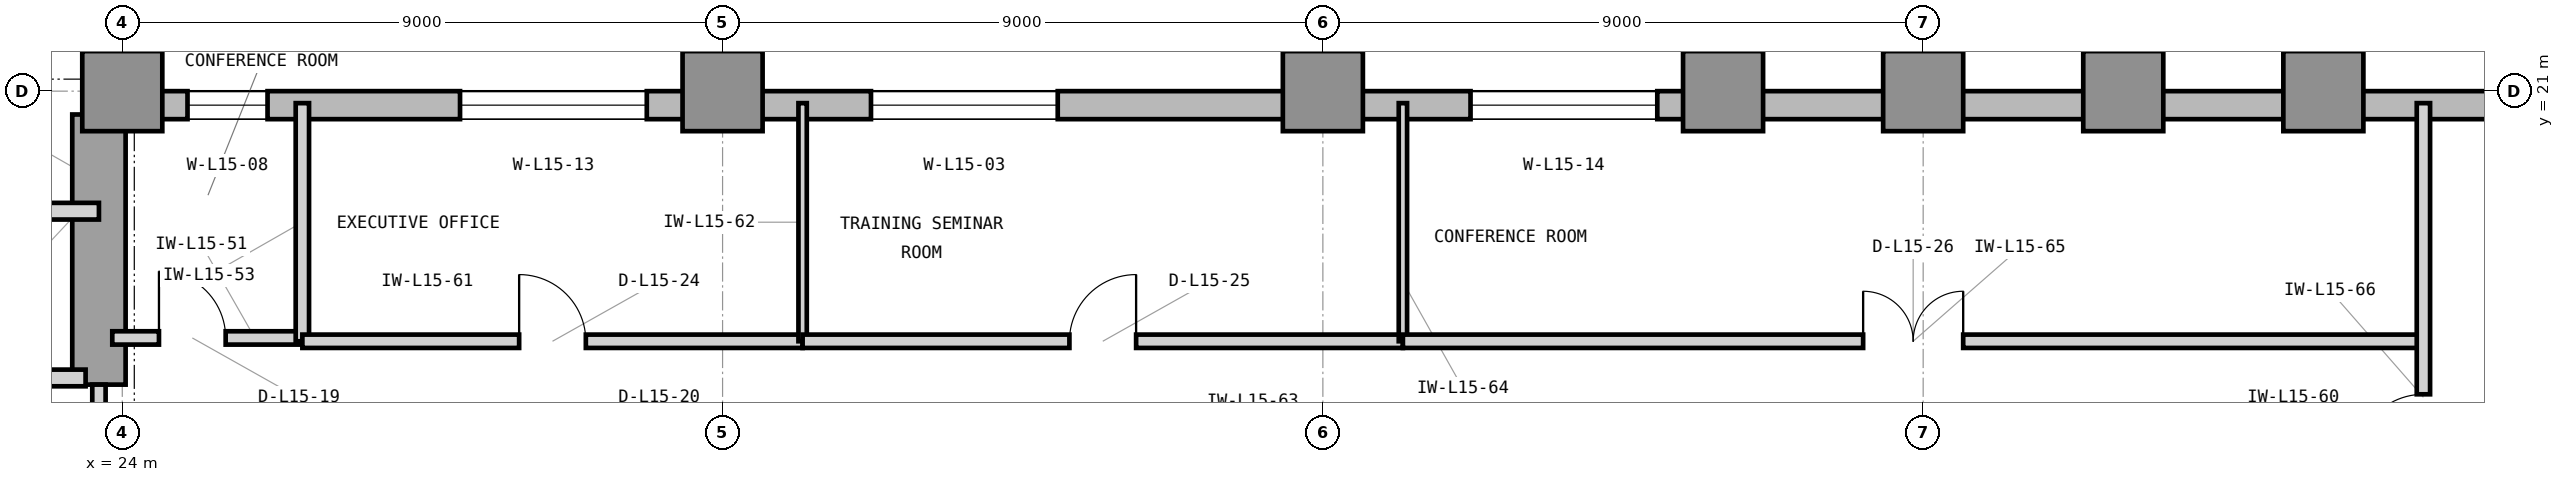
"""IFC4 building model, lengths in metres.
Left out: names, types, materials, properties, quantities, classifications, styles, units other than length and angle.
Written with IfcOpenShell. Run it as: python <this file> out.ifc"""

import sys

from ifc_helpers import new_model, si_unit, direction, frame, frame_2d, origin, origin_2d, place, context, subcontext, project, spatial, rectangle, extrude, element, fill, save


model = new_model("IFC4")
c1 = context("Model", 3, precision=1e-05, world=origin(), true_north=direction((0.0, 1.0)))
c2 = subcontext(c1, "Body", "Model", "MODEL_VIEW")
j1 = project(units=[si_unit("LENGTHUNIT", "METRE"), si_unit("PLANEANGLEUNIT", "RADIAN")], contexts=[c1])
p1 = place(None, origin())
s1 = spatial("IfcSite", under=j1, at=p1, CompositionType="ELEMENT")
p2 = place(p1, origin())
s2 = spatial("IfcBuilding", under=s1, at=p2, CompositionType="ELEMENT")
p3 = place(p2, frame((0.0, 0.0, 67.8)))
s3 = spatial("IfcBuildingStorey", under=s2, at=p3, CompositionType="ELEMENT", Elevation=67.8)
p4 = place(p3, frame((23.65, 16.6, 0.0), z_axis=(0.0, 0.0, 1.0), x_axis=(0.0, 1.0, 0.0)))
e1 = element("IfcWall", 1, at=p4, inside=s3, PredefinedType="SHEAR", context=c2, shape_type="SweptSolid", body=[
    extrude(rectangle(XDim=4.05, YDim=0.8, at=frame_2d((2.025, 0.0))), origin(), (0.0, 0.0, 1.0), 4.2),
])
for number, where, z_axis, x_axis in (
    (2, (24.0, 21.0, 0.0), (0.0, 0.0, 1.0), (1.0, 0.0, 0.0)),
    (3, (33.0, 21.0, 0.0), (0.0, 0.0, 1.0), (1.0, 0.0, 0.0)),
    (4, (42.0, 21.0, 0.0), (0.0, 0.0, 1.0), (1.0, 0.0, 0.0)),
    (5, (48.0, 21.0, 0.0), (0.0, 0.0, 1.0), (1.0, 0.0, 0.0)),
    (6, (51.0, 21.0, 0.0), (0.0, 0.0, 1.0), (1.0, 0.0, 0.0)),
    (7, (54.0, 21.0, 0.0), (0.0, 0.0, 1.0), (1.0, 0.0, 0.0)),
    (8, (57.0, 21.0, 0.0), (0.0, 0.0, 1.0), (1.0, 0.0, 0.0)),
):
    element("IfcColumn", number, at=place(p3, frame(where, z_axis=z_axis, x_axis=x_axis)), inside=s3, PredefinedType="COLUMN", context=c2, shape_type="SweptSolid", body=[
        extrude(rectangle(XDim=1.2, YDim=1.2, at=origin_2d()), origin(), (0.0, 0.0, 1.0), 4.2),
    ])
p5 = place(p3, frame((64.4, 20.79, 0.0), z_axis=(0.0, 0.0, 1.0), x_axis=(-1.0, 0.0, 0.0)))
e9 = element("IfcWall", 9, at=p5, inside=s3, PredefinedType="STANDARD", context=c2, shape_type="SweptSolid", body=[
    extrude(rectangle(XDim=40.4, YDim=0.42, at=frame_2d((20.2, 0.0))), origin(), (0.0, 0.0, 1.0), 3.98),
])
p6 = place(p5, frame((26.375, 0.0, 0.85)))
e10 = element("IfcOpeningElement", 10, at=p6, cuts=e9, PredefinedType="OPENING", context=c2, shape_type="SweptSolid", body=[
    extrude(rectangle(XDim=2.8, YDim=2.45, at=frame_2d((1.4, 1.225))), frame((0.0, 0.22, 0.0), z_axis=(0.0, -1.0, 0.0), x_axis=(1.0, 0.0, 0.0)), (0.0, 0.0, 1.0), 0.44),
])
p7 = place(p5, frame((38.222, 0.0, 0.85)))
e11 = element("IfcOpeningElement", 11, at=p7, cuts=e9, PredefinedType="OPENING", context=c2, shape_type="SweptSolid", body=[
    extrude(rectangle(XDim=1.2, YDim=2.45, at=frame_2d((0.6, 1.225))), frame((0.0, 0.22, 0.0), z_axis=(0.0, -1.0, 0.0), x_axis=(1.0, 0.0, 0.0)), (0.0, 0.0, 1.0), 0.44),
])
p8 = place(p5, frame((32.536, 0.0, 0.85)))
e12 = element("IfcOpeningElement", 12, at=p8, cuts=e9, PredefinedType="OPENING", context=c2, shape_type="SweptSolid", body=[
    extrude(rectangle(XDim=2.8, YDim=2.45, at=frame_2d((1.4, 1.225))), frame((0.0, 0.22, 0.0), z_axis=(0.0, -1.0, 0.0), x_axis=(1.0, 0.0, 0.0)), (0.0, 0.0, 1.0), 0.44),
])
p9 = place(p5, frame((17.386, 0.0, 0.85)))
e13 = element("IfcOpeningElement", 13, at=p9, cuts=e9, PredefinedType="OPENING", context=c2, shape_type="SweptSolid", body=[
    extrude(rectangle(XDim=2.8, YDim=2.45, at=frame_2d((1.4, 1.225))), frame((0.0, 0.22, 0.0), z_axis=(0.0, -1.0, 0.0), x_axis=(1.0, 0.0, 0.0)), (0.0, 0.0, 1.0), 0.44),
])
p10 = place(p3, frame((23.79, 21.0, 0.0), z_axis=(0.0, 0.0, 1.0), x_axis=(0.0, 1.0, 0.0)))
e14 = element("IfcWall", 14, at=p10, inside=s3, PredefinedType="STANDARD", context=c2, shape_type="SweptSolid", body=[
    extrude(rectangle(XDim=28.4, YDim=0.42, at=frame_2d((14.2, 0.0))), origin(), (0.0, 0.0, 1.0), 3.98),
])
p11 = place(p10, frame((10.433, 0.0, 0.85)))
e15 = element("IfcOpeningElement", 15, at=p11, cuts=e14, PredefinedType="OPENING", context=c2, shape_type="SweptSolid", body=[
    extrude(rectangle(XDim=2.8, YDim=2.45, at=frame_2d((1.4, 1.225))), frame((0.0, 0.22, 0.0), z_axis=(0.0, -1.0, 0.0), x_axis=(1.0, 0.0, 0.0)), (0.0, 0.0, 1.0), 0.44),
])
p12 = place(p10, frame((16.016, 0.0, 0.85)))
e16 = element("IfcOpeningElement", 16, at=p12, cuts=e14, PredefinedType="OPENING", context=c2, shape_type="SweptSolid", body=[
    extrude(rectangle(XDim=1.2, YDim=2.45, at=frame_2d((0.6, 1.225))), frame((0.0, 0.22, 0.0), z_axis=(0.0, -1.0, 0.0), x_axis=(1.0, 0.0, 0.0)), (0.0, 0.0, 1.0), 0.44),
])
p13 = place(p3, frame((21.05, 16.7, 0.0), z_axis=(0.0, 0.0, 1.0), x_axis=(1.0, 0.0, 0.0)))
e17 = element("IfcWall", 17, at=p13, inside=s3, PredefinedType="PARTITIONING", context=c2, shape_type="SweptSolid", body=[
    extrude(rectangle(XDim=2.4, YDim=0.25, at=frame_2d((1.2, 0.0))), origin(), (0.0, 0.0, 1.0), 3.426),
])
p14 = place(p3, frame((16.45, 19.2, 0.0), z_axis=(0.0, 0.0, 1.0), x_axis=(1.0, 0.0, 0.0)))
e18 = element("IfcWall", 18, at=p14, inside=s3, PredefinedType="PARTITIONING", context=c2, shape_type="SweptSolid", body=[
    extrude(rectangle(XDim=7.2, YDim=0.25, at=frame_2d((3.6, 0.0))), origin(), (0.0, 0.0, 1.0), 3.97),
])
p15 = place(p3, frame((23.65, 13.6, 0.0), z_axis=(0.0, 0.0, 1.0), x_axis=(0.0, 1.0, 0.0)))
e19 = element("IfcWall", 19, at=p15, inside=s3, PredefinedType="PARTITIONING", context=c2, shape_type="SweptSolid", body=[
    extrude(rectangle(XDim=3.0, YDim=0.2, at=frame_2d((1.5, 0.0))), origin(), (0.0, 0.0, 1.0), 3.97),
])
p16 = place(p15, frame((1.02, 0.0, 0.0)))
e20 = element("IfcOpeningElement", 20, at=p16, cuts=e19, PredefinedType="OPENING", context=c2, shape_type="SweptSolid", body=[
    extrude(rectangle(XDim=0.95, YDim=2.1, at=frame_2d((0.475, 1.05))), frame((0.0, 0.11, 0.0), z_axis=(0.0, -1.0, 0.0), x_axis=(1.0, 0.0, 0.0)), (0.0, 0.0, 1.0), 0.22),
])
p17 = place(p3, frame((23.85, 17.3, 0.0), z_axis=(0.0, 0.0, 1.0), x_axis=(1.0, 0.0, 0.0)))
e21 = element("IfcWall", 21, at=p17, inside=s3, PredefinedType="PARTITIONING", context=c2, shape_type="SweptSolid", body=[
    extrude(rectangle(XDim=2.85, YDim=0.2, at=frame_2d((1.425, 0.0))), origin(), (0.0, 0.0, 1.0), 3.97),
])
p18 = place(p17, frame((0.7, 0.0, 0.0)))
e22 = element("IfcOpeningElement", 22, at=p18, cuts=e21, PredefinedType="OPENING", context=c2, shape_type="SweptSolid", body=[
    extrude(rectangle(XDim=1.0, YDim=2.15, at=frame_2d((0.5, 1.075))), frame((0.0, 0.11, 0.0), z_axis=(0.0, -1.0, 0.0), x_axis=(1.0, 0.0, 0.0)), (0.0, 0.0, 1.0), 0.22),
])
p19 = place(p3, frame((26.7, 17.25, 0.0), z_axis=(0.0, 0.0, 1.0), x_axis=(0.0, 1.0, 0.0)))
e23 = element("IfcWall", 23, at=p19, inside=s3, PredefinedType="PARTITIONING", context=c2, shape_type="SweptSolid", body=[
    extrude(rectangle(XDim=3.57, YDim=0.2, at=frame_2d((1.785, 0.0))), origin(), (0.0, 0.0, 1.0), 3.97),
])
p20 = place(p3, frame((26.7, 17.25, 0.0), z_axis=(0.0, 0.0, 1.0), x_axis=(1.0, 0.0, 0.0)))
e24 = element("IfcWall", 24, at=p20, inside=s3, PredefinedType="PARTITIONING", context=c2, shape_type="SweptSolid", body=[
    extrude(rectangle(XDim=7.5, YDim=0.2, at=frame_2d((3.75, 0.0))), origin(), (0.0, 0.0, 1.0), 3.97),
])
p21 = place(p20, frame((3.25, 0.0, 0.0)))
e25 = element("IfcOpeningElement", 25, at=p21, cuts=e24, PredefinedType="OPENING", context=c2, shape_type="SweptSolid", body=[
    extrude(rectangle(XDim=1.0, YDim=2.15, at=frame_2d((0.5, 1.075))), frame((0.0, 0.11, 0.0), z_axis=(0.0, -1.0, 0.0), x_axis=(1.0, 0.0, 0.0)), (0.0, 0.0, 1.0), 0.22),
])
p22 = place(p3, frame((34.2, 17.25, 0.0), z_axis=(0.0, 0.0, 1.0), x_axis=(0.0, 1.0, 0.0)))
e26 = element("IfcWall", 26, at=p22, inside=s3, PredefinedType="PARTITIONING", context=c2, shape_type="SweptSolid", body=[
    extrude(rectangle(XDim=3.57, YDim=0.125, at=frame_2d((1.785, 0.0))), origin(), (0.0, 0.0, 1.0), 3.97),
])
p23 = place(p3, frame((34.2, 17.25, 0.0), z_axis=(0.0, 0.0, 1.0), x_axis=(1.0, 0.0, 0.0)))
e27 = element("IfcWall", 27, at=p23, inside=s3, PredefinedType="PARTITIONING", context=c2, shape_type="SweptSolid", body=[
    extrude(rectangle(XDim=9.0, YDim=0.2, at=frame_2d((4.5, 0.0))), origin(), (0.0, 0.0, 1.0), 3.97),
])
p24 = place(p23, frame((4.0, 0.0, 0.0)))
e28 = element("IfcOpeningElement", 28, at=p24, cuts=e27, PredefinedType="OPENING", context=c2, shape_type="SweptSolid", body=[
    extrude(rectangle(XDim=1.0, YDim=2.15, at=frame_2d((0.5, 1.075))), frame((0.0, 0.11, 0.0), z_axis=(0.0, -1.0, 0.0), x_axis=(1.0, 0.0, 0.0)), (0.0, 0.0, 1.0), 0.22),
])
p25 = place(p3, frame((43.2, 17.25, 0.0), z_axis=(0.0, 0.0, 1.0), x_axis=(0.0, 1.0, 0.0)))
e29 = element("IfcWall", 29, at=p25, inside=s3, PredefinedType="PARTITIONING", context=c2, shape_type="SweptSolid", body=[
    extrude(rectangle(XDim=3.57, YDim=0.125, at=frame_2d((1.785, 0.0))), origin(), (0.0, 0.0, 1.0), 3.97),
])
p26 = place(p3, frame((43.2, 17.25, 0.0), z_axis=(0.0, 0.0, 1.0), x_axis=(1.0, 0.0, 0.0)))
e30 = element("IfcWall", 30, at=p26, inside=s3, PredefinedType="PARTITIONING", context=c2, shape_type="SweptSolid", body=[
    extrude(rectangle(XDim=15.3, YDim=0.2, at=frame_2d((7.65, 0.0))), origin(), (0.0, 0.0, 1.0), 3.97),
])
p27 = place(p26, frame((6.9, 0.0, 0.0)))
e31 = element("IfcOpeningElement", 31, at=p27, cuts=e30, PredefinedType="OPENING", context=c2, shape_type="SweptSolid", body=[
    extrude(rectangle(XDim=1.5, YDim=2.3, at=frame_2d((0.75, 1.15))), frame((0.0, 0.11, 0.0), z_axis=(0.0, -1.0, 0.0), x_axis=(1.0, 0.0, 0.0)), (0.0, 0.0, 1.0), 0.22),
])
p28 = place(p3, frame((58.5, 3.18, 0.0), z_axis=(0.0, 0.0, 1.0), x_axis=(0.0, 1.0, 0.0)))
e32 = element("IfcWall", 32, at=p28, inside=s3, PredefinedType="PARTITIONING", context=c2, shape_type="SweptSolid", body=[
    extrude(rectangle(XDim=17.64, YDim=0.2, at=frame_2d((8.82, 0.0))), origin(), (0.0, 0.0, 1.0), 3.97),
])
p29 = place(p28, frame((12.275, 0.0, 0.0)))
e33 = element("IfcOpeningElement", 33, at=p29, cuts=e32, PredefinedType="OPENING", context=c2, shape_type="SweptSolid", body=[
    extrude(rectangle(XDim=1.0, YDim=2.15, at=frame_2d((0.5, 1.075))), frame((0.0, 0.11, 0.0), z_axis=(0.0, -1.0, 0.0), x_axis=(1.0, 0.0, 0.0)), (0.0, 0.0, 1.0), 0.22),
])
p30 = place(p6, origin())
e34 = element("IfcWindow", 34, at=p30, inside=s3, PartitioningType="SINGLE_PANEL", PredefinedType="WINDOW", context=c2, shape_type="SweptSolid", body=[
    extrude(rectangle(XDim=2.8, YDim=2.45, at=frame_2d((1.4, 1.225))), frame((0.0, 0.11, 0.0), z_axis=(0.0, -1.0, 0.0), x_axis=(1.0, 0.0, 0.0)), (0.0, 0.0, 1.0), 0.06),
])
fill(e10, e34)
p31 = place(p18, origin())
e35 = element("IfcDoor", 35, at=p31, inside=s3, OperationType="SINGLE_SWING_LEFT", PredefinedType="DOOR", context=c2, shape_type="SweptSolid", body=[
    extrude(rectangle(XDim=1.0, YDim=2.15, at=frame_2d((0.5, 1.075))), frame((0.0, 0.025, 0.0), z_axis=(0.0, -1.0, 0.0), x_axis=(1.0, 0.0, 0.0)), (0.0, 0.0, 1.0), 0.05),
])
fill(e22, e35)
p32 = place(p21, origin())
e36 = element("IfcDoor", 36, at=p32, inside=s3, OperationType="SINGLE_SWING_LEFT", PredefinedType="DOOR", context=c2, shape_type="SweptSolid", body=[
    extrude(rectangle(XDim=1.0, YDim=2.15, at=frame_2d((0.5, 1.075))), frame((0.0, 0.025, 0.0), z_axis=(0.0, -1.0, 0.0), x_axis=(1.0, 0.0, 0.0)), (0.0, 0.0, 1.0), 0.05),
])
fill(e25, e36)
p33 = place(p24, origin())
e37 = element("IfcDoor", 37, at=p33, inside=s3, OperationType="SINGLE_SWING_RIGHT", PredefinedType="DOOR", context=c2, shape_type="SweptSolid", body=[
    extrude(rectangle(XDim=1.0, YDim=2.15, at=frame_2d((0.5, 1.075))), frame((0.0, 0.025, 0.0), z_axis=(0.0, -1.0, 0.0), x_axis=(1.0, 0.0, 0.0)), (0.0, 0.0, 1.0), 0.05),
])
fill(e28, e37)
p34 = place(p27, origin())
e38 = element("IfcDoor", 38, at=p34, inside=s3, OperationType="DOUBLE_DOOR_SINGLE_SWING", PredefinedType="DOOR", context=c2, shape_type="SweptSolid", body=[
    extrude(rectangle(XDim=1.5, YDim=2.3, at=frame_2d((0.75, 1.15))), frame((0.0, 0.025, 0.0), z_axis=(0.0, -1.0, 0.0), x_axis=(1.0, 0.0, 0.0)), (0.0, 0.0, 1.0), 0.05),
])
fill(e31, e38)
p35 = place(p29, origin())
e39 = element("IfcDoor", 39, at=p35, inside=s3, OperationType="SINGLE_SWING_LEFT", PredefinedType="DOOR", context=c2, shape_type="SweptSolid", body=[
    extrude(rectangle(XDim=1.0, YDim=2.15, at=frame_2d((0.5, 1.075))), frame((0.0, 0.025, 0.0), z_axis=(0.0, -1.0, 0.0), x_axis=(1.0, 0.0, 0.0)), (0.0, 0.0, 1.0), 0.05),
])
fill(e33, e39)
p36 = place(p7, origin())
e40 = element("IfcWindow", 40, at=p36, inside=s3, PartitioningType="SINGLE_PANEL", PredefinedType="WINDOW", context=c2, shape_type="SweptSolid", body=[
    extrude(rectangle(XDim=1.2, YDim=2.45, at=frame_2d((0.6, 1.225))), frame((0.0, 0.11, 0.0), z_axis=(0.0, -1.0, 0.0), x_axis=(1.0, 0.0, 0.0)), (0.0, 0.0, 1.0), 0.06),
])
fill(e11, e40)
p37 = place(p8, origin())
e41 = element("IfcWindow", 41, at=p37, inside=s3, PartitioningType="SINGLE_PANEL", PredefinedType="WINDOW", context=c2, shape_type="SweptSolid", body=[
    extrude(rectangle(XDim=2.8, YDim=2.45, at=frame_2d((1.4, 1.225))), frame((0.0, 0.11, 0.0), z_axis=(0.0, -1.0, 0.0), x_axis=(1.0, 0.0, 0.0)), (0.0, 0.0, 1.0), 0.06),
])
fill(e12, e41)
p38 = place(p9, origin())
e42 = element("IfcWindow", 42, at=p38, inside=s3, PartitioningType="SINGLE_PANEL", PredefinedType="WINDOW", context=c2, shape_type="SweptSolid", body=[
    extrude(rectangle(XDim=2.8, YDim=2.45, at=frame_2d((1.4, 1.225))), frame((0.0, 0.11, 0.0), z_axis=(0.0, -1.0, 0.0), x_axis=(1.0, 0.0, 0.0)), (0.0, 0.0, 1.0), 0.06),
])
fill(e13, e42)
save(model, sys.argv[1])
